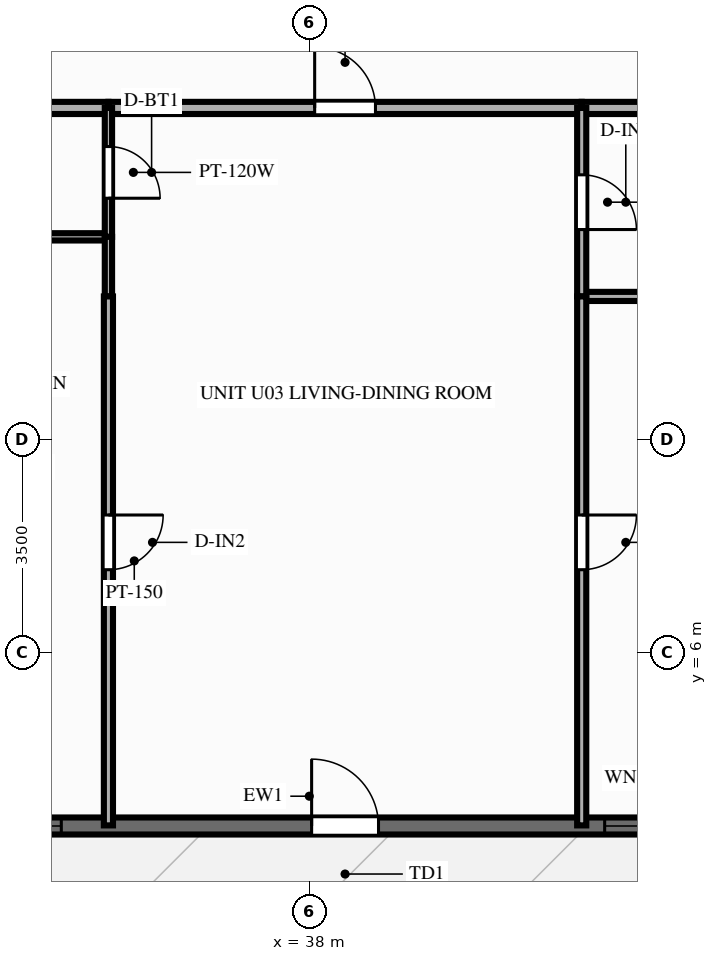
"""IFC4 building model, lengths in metres.
Left out: names, types, materials, properties, quantities, classifications, styles, units other than length and angle.
Written with IfcOpenShell. Run it as: python <this file> out.ifc"""

import sys

from ifc_helpers import new_model, si_unit, direction, frame, frame_2d, origin, place, context, subcontext, project, spatial, rectangle, extrude, source, transform, mapped, element, fill, save


model = new_model("IFC4")
c1 = context("Model", 3, precision=1e-05, world=origin(), true_north=direction((0.0, 1.0)))
c2 = subcontext(c1, "Body", "Model", "MODEL_VIEW")
j1 = project(units=[si_unit("LENGTHUNIT", "METRE"), si_unit("PLANEANGLEUNIT", "RADIAN")], contexts=[c1])
p1 = place(None, origin())
s1 = spatial("IfcSite", under=j1, at=p1, CompositionType="ELEMENT")
p2 = place(p1, origin())
s2 = spatial("IfcBuilding", under=s1, at=p2, CompositionType="ELEMENT")
p3 = place(p2, frame((0.0, 0.0, 80.85)))
s3 = spatial("IfcBuildingStorey", under=s2, at=p3, CompositionType="ELEMENT", Elevation=80.85)
p4 = place(p3, frame((16.2, 3.14, 0.0), z_axis=(0.0, 0.0, 1.0), x_axis=(1.0, 0.0, 0.0)))
e1 = element("IfcWall", 1, at=p4, inside=s3, PredefinedType="SOLIDWALL", context=c2, shape_type="SweptSolid", body=[
    extrude(rectangle(XDim=43.6, YDim=0.28, at=frame_2d((21.8, 0.0))), origin(), (0.0, 0.0, 1.0), 2.28),
])
p5 = place(p4, frame((0.748, 0.0, 0.25)))
e2 = element("IfcOpeningElement", 2, at=p5, cuts=e1, PredefinedType="OPENING", context=c2, shape_type="SweptSolid", body=[
    extrude(rectangle(XDim=1.2, YDim=1.5, at=frame_2d((0.6, 0.75))), frame((0.0, 0.152, 0.0), z_axis=(0.0, -1.0, 0.0), x_axis=(1.0, 0.0, 0.0)), (0.0, 0.0, 1.0), 0.304),
])
p6 = place(p4, frame((3.093, 0.0, 0.25)))
e3 = element("IfcOpeningElement", 3, at=p6, cuts=e1, PredefinedType="OPENING", context=c2, shape_type="SweptSolid", body=[
    extrude(rectangle(XDim=1.2, YDim=1.5, at=frame_2d((0.6, 0.75))), frame((0.0, 0.152, 0.0), z_axis=(0.0, -1.0, 0.0), x_axis=(1.0, 0.0, 0.0)), (0.0, 0.0, 1.0), 0.304),
])
p7 = place(p4, frame((5.885, 0.0, 0.25)))
e4 = element("IfcOpeningElement", 4, at=p7, cuts=e1, PredefinedType="OPENING", context=c2, shape_type="SweptSolid", body=[
    extrude(rectangle(XDim=1.2, YDim=1.5, at=frame_2d((0.6, 0.75))), frame((0.0, 0.152, 0.0), z_axis=(0.0, -1.0, 0.0), x_axis=(1.0, 0.0, 0.0)), (0.0, 0.0, 1.0), 0.304),
])
p8 = place(p4, frame((8.463, 0.0, 0.25)))
e5 = element("IfcOpeningElement", 5, at=p8, cuts=e1, PredefinedType="OPENING", context=c2, shape_type="SweptSolid", body=[
    extrude(rectangle(XDim=1.2, YDim=1.5, at=frame_2d((0.6, 0.75))), frame((0.0, 0.152, 0.0), z_axis=(0.0, -1.0, 0.0), x_axis=(1.0, 0.0, 0.0)), (0.0, 0.0, 1.0), 0.304),
])
p9 = place(p4, frame((10.876, 0.0, 0.25)))
e6 = element("IfcOpeningElement", 6, at=p9, cuts=e1, PredefinedType="OPENING", context=c2, shape_type="SweptSolid", body=[
    extrude(rectangle(XDim=1.2, YDim=1.5, at=frame_2d((0.6, 0.75))), frame((0.0, 0.152, 0.0), z_axis=(0.0, -1.0, 0.0), x_axis=(1.0, 0.0, 0.0)), (0.0, 0.0, 1.0), 0.304),
])
p10 = place(p4, frame((13.287, 0.0, 0.25)))
e7 = element("IfcOpeningElement", 7, at=p10, cuts=e1, PredefinedType="OPENING", context=c2, shape_type="SweptSolid", body=[
    extrude(rectangle(XDim=1.2, YDim=1.5, at=frame_2d((0.6, 0.75))), frame((0.0, 0.152, 0.0), z_axis=(0.0, -1.0, 0.0), x_axis=(1.0, 0.0, 0.0)), (0.0, 0.0, 1.0), 0.304),
])
p11 = place(p4, frame((16.521, 0.0, 0.25)))
e8 = element("IfcOpeningElement", 8, at=p11, cuts=e1, PredefinedType="OPENING", context=c2, shape_type="SweptSolid", body=[
    extrude(rectangle(XDim=1.2, YDim=1.5, at=frame_2d((0.6, 0.75))), frame((0.0, 0.152, 0.0), z_axis=(0.0, -1.0, 0.0), x_axis=(1.0, 0.0, 0.0)), (0.0, 0.0, 1.0), 0.304),
])
p12 = place(p4, frame((22.938, 0.0, 0.0), z_axis=(0.0, 0.0, 1.0), x_axis=(-1.0, 0.0, 0.0)))
e9 = element("IfcOpeningElement", 9, at=p12, cuts=e1, PredefinedType="OPENING", context=c2, shape_type="SweptSolid", body=[
    extrude(rectangle(XDim=1.1, YDim=2.15, at=frame_2d((0.55, 1.075))), frame((0.0, 0.152, 0.0), z_axis=(0.0, -1.0, 0.0), x_axis=(1.0, 0.0, 0.0)), (0.0, 0.0, 1.0), 0.304),
])
p13 = place(p4, frame((26.657, 0.0, 0.25)))
e10 = element("IfcOpeningElement", 10, at=p13, cuts=e1, PredefinedType="OPENING", context=c2, shape_type="SweptSolid", body=[
    extrude(rectangle(XDim=0.95, YDim=1.5, at=frame_2d((0.475, 0.75))), frame((0.0, 0.152, 0.0), z_axis=(0.0, -1.0, 0.0), x_axis=(1.0, 0.0, 0.0)), (0.0, 0.0, 1.0), 0.304),
])
p14 = place(p4, frame((28.965, 0.0, 0.25)))
e11 = element("IfcOpeningElement", 11, at=p14, cuts=e1, PredefinedType="OPENING", context=c2, shape_type="SweptSolid", body=[
    extrude(rectangle(XDim=0.7, YDim=1.5, at=frame_2d((0.35, 0.75))), frame((0.0, 0.152, 0.0), z_axis=(0.0, -1.0, 0.0), x_axis=(1.0, 0.0, 0.0)), (0.0, 0.0, 1.0), 0.304),
])
p15 = place(p4, frame((31.158, 0.0, 0.25)))
e12 = element("IfcOpeningElement", 12, at=p15, cuts=e1, PredefinedType="OPENING", context=c2, shape_type="SweptSolid", body=[
    extrude(rectangle(XDim=1.2, YDim=1.5, at=frame_2d((0.6, 0.75))), frame((0.0, 0.152, 0.0), z_axis=(0.0, -1.0, 0.0), x_axis=(1.0, 0.0, 0.0)), (0.0, 0.0, 1.0), 0.304),
])
p16 = place(p4, frame((35.992, 0.0, 0.25)))
e13 = element("IfcOpeningElement", 13, at=p16, cuts=e1, PredefinedType="OPENING", context=c2, shape_type="SweptSolid", body=[
    extrude(rectangle(XDim=1.2, YDim=1.5, at=frame_2d((0.6, 0.75))), frame((0.0, 0.152, 0.0), z_axis=(0.0, -1.0, 0.0), x_axis=(1.0, 0.0, 0.0)), (0.0, 0.0, 1.0), 0.304),
])
p17 = place(p4, frame((40.885, 0.0, 0.25)))
e14 = element("IfcOpeningElement", 14, at=p17, cuts=e1, PredefinedType="OPENING", context=c2, shape_type="SweptSolid", body=[
    extrude(rectangle(XDim=1.2, YDim=1.5, at=frame_2d((0.6, 0.75))), frame((0.0, 0.152, 0.0), z_axis=(0.0, -1.0, 0.0), x_axis=(1.0, 0.0, 0.0)), (0.0, 0.0, 1.0), 0.304),
])
p18 = place(p3, frame((31.946, 14.95, 0.0), z_axis=(0.0, 0.0, 1.0), x_axis=(1.0, 0.0, 0.0)))
e15 = element("IfcWall", 15, at=p18, inside=s3, PredefinedType="PARTITIONING", context=c2, shape_type="SweptSolid", body=[
    extrude(rectangle(XDim=2.75, YDim=0.2, at=frame_2d((1.375, 0.0))), origin(), (0.0, 0.0, 1.0), 2.79),
])
p19 = place(p3, frame((34.696, 14.95, 0.0), z_axis=(0.0, 0.0, 1.0), x_axis=(1.0, 0.0, 0.0)))
e16 = element("IfcWall", 16, at=p19, inside=s3, PredefinedType="PARTITIONING", context=c2, shape_type="SweptSolid", body=[
    extrude(rectangle(XDim=7.784, YDim=0.2, at=frame_2d((3.892, 0.0))), origin(), (0.0, 0.0, 1.0), 2.79),
])
p20 = place(p19, frame((3.392, 0.0, 0.0)))
e17 = element("IfcOpeningElement", 17, at=p20, cuts=e16, PredefinedType="OPENING", context=c2, shape_type="SweptSolid", body=[
    extrude(rectangle(XDim=1.0, YDim=2.15, at=frame_2d((0.5, 1.075))), frame((0.0, 0.112, 0.0), z_axis=(0.0, -1.0, 0.0), x_axis=(1.0, 0.0, 0.0)), (0.0, 0.0, 1.0), 0.224),
])
p21 = place(p3, frame((42.48, 14.95, 0.0), z_axis=(0.0, 0.0, 1.0), x_axis=(1.0, 0.0, 0.0)))
e18 = element("IfcWall", 18, at=p21, inside=s3, PredefinedType="PARTITIONING", context=c2, shape_type="SweptSolid", body=[
    extrude(rectangle(XDim=3.736, YDim=0.2, at=frame_2d((1.868, 0.0))), origin(), (0.0, 0.0, 1.0), 2.79),
])
p22 = place(p3, frame((31.946, 12.83, 0.0), z_axis=(0.0, 0.0, 1.0), x_axis=(1.0, 0.0, 0.0)))
e19 = element("IfcWall", 19, at=p22, inside=s3, PredefinedType="PARTITIONING", context=c2, shape_type="SweptSolid", body=[
    extrude(rectangle(XDim=2.75, YDim=0.12, at=frame_2d((1.375, 0.0))), origin(), (0.0, 0.0, 1.0), 2.79),
])
p23 = place(p3, frame((42.48, 11.85, 0.0), z_axis=(0.0, 0.0, 1.0), x_axis=(1.0, 0.0, 0.0)))
e20 = element("IfcWall", 20, at=p23, inside=s3, PredefinedType="PARTITIONING", context=c2, shape_type="SweptSolid", body=[
    extrude(rectangle(XDim=3.736, YDim=0.15, at=frame_2d((1.868, 0.0))), origin(), (0.0, 0.0, 1.0), 2.79),
])
p24 = place(p3, frame((34.696, 14.95, 0.0), z_axis=(0.0, 0.0, 1.0), x_axis=(0.0, -1.0, 0.0)))
e21 = element("IfcWall", 21, at=p24, inside=s3, PredefinedType="PARTITIONING", context=c2, shape_type="SweptSolid", body=[
    extrude(rectangle(XDim=2.12, YDim=0.12, at=frame_2d((1.06, 0.0))), origin(), (0.0, 0.0, 1.0), 2.79),
])
p25 = place(p24, frame((0.635, 0.0, 0.0)))
e22 = element("IfcOpeningElement", 22, at=p25, cuts=e21, PredefinedType="OPENING", context=c2, shape_type="SweptSolid", body=[
    extrude(rectangle(XDim=0.85, YDim=2.05, at=frame_2d((0.425, 1.025))), frame((0.0, 0.072, 0.0), z_axis=(0.0, -1.0, 0.0), x_axis=(1.0, 0.0, 0.0)), (0.0, 0.0, 1.0), 0.144),
])
p26 = place(p3, frame((34.696, 12.83, 0.0), z_axis=(0.0, 0.0, 1.0), x_axis=(0.0, -1.0, 0.0)))
e23 = element("IfcWall", 23, at=p26, inside=s3, PredefinedType="PARTITIONING", context=c2, shape_type="SweptSolid", body=[
    extrude(rectangle(XDim=0.98, YDim=0.12, at=frame_2d((0.49, 0.0))), origin(), (0.0, 0.0, 1.0), 2.79),
])
p27 = place(p3, frame((34.696, 11.85, 0.0), z_axis=(0.0, 0.0, 1.0), x_axis=(0.0, -1.0, 0.0)))
e24 = element("IfcWall", 24, at=p27, inside=s3, PredefinedType="PARTITIONING", context=c2, shape_type="SweptSolid", body=[
    extrude(rectangle(XDim=8.7, YDim=0.15, at=frame_2d((4.35, 0.0))), origin(), (0.0, 0.0, 1.0), 2.79),
])
p28 = place(p27, frame((3.595, 0.0, 0.0)))
e25 = element("IfcOpeningElement", 25, at=p28, cuts=e24, PredefinedType="OPENING", context=c2, shape_type="SweptSolid", body=[
    extrude(rectangle(XDim=0.9, YDim=2.1, at=frame_2d((0.45, 1.05))), frame((0.0, 0.087, 0.0), z_axis=(0.0, -1.0, 0.0), x_axis=(1.0, 0.0, 0.0)), (0.0, 0.0, 1.0), 0.174),
])
p29 = place(p3, frame((42.48, 14.95, 0.0), z_axis=(0.0, 0.0, 1.0), x_axis=(0.0, -1.0, 0.0)))
e26 = element("IfcWall", 26, at=p29, inside=s3, PredefinedType="PARTITIONING", context=c2, shape_type="SweptSolid", body=[
    extrude(rectangle(XDim=3.1, YDim=0.15, at=frame_2d((1.55, 0.0))), origin(), (0.0, 0.0, 1.0), 2.79),
])
p30 = place(p29, frame((1.1, 0.0, 0.0)))
e27 = element("IfcOpeningElement", 27, at=p30, cuts=e26, PredefinedType="OPENING", context=c2, shape_type="SweptSolid", body=[
    extrude(rectangle(XDim=0.9, YDim=2.1, at=frame_2d((0.45, 1.05))), frame((0.0, 0.087, 0.0), z_axis=(0.0, -1.0, 0.0), x_axis=(1.0, 0.0, 0.0)), (0.0, 0.0, 1.0), 0.174),
])
p31 = place(p3, frame((42.48, 11.85, 0.0), z_axis=(0.0, 0.0, 1.0), x_axis=(0.0, -1.0, 0.0)))
e28 = element("IfcWall", 28, at=p31, inside=s3, PredefinedType="PARTITIONING", context=c2, shape_type="SweptSolid", body=[
    extrude(rectangle(XDim=8.7, YDim=0.15, at=frame_2d((4.35, 0.0))), origin(), (0.0, 0.0, 1.0), 2.79),
])
p32 = place(p31, frame((3.595, 0.0, 0.0)))
e29 = element("IfcOpeningElement", 29, at=p32, cuts=e28, PredefinedType="OPENING", context=c2, shape_type="SweptSolid", body=[
    extrude(rectangle(XDim=0.9, YDim=2.1, at=frame_2d((0.45, 1.05))), frame((0.0, 0.087, 0.0), z_axis=(0.0, -1.0, 0.0), x_axis=(1.0, 0.0, 0.0)), (0.0, 0.0, 1.0), 0.174),
])
m1 = source(origin(), c2, "Body", "SweptSolid", [
    extrude(rectangle(XDim=1.2, YDim=1.5, at=frame_2d((0.6, 0.75))), frame((0.0, 0.03, 0.0), z_axis=(0.0, -1.0, 0.0), x_axis=(1.0, 0.0, 0.0)), (0.0, 0.0, 1.0), 0.06),
])
p33 = place(p11, origin())
e30 = element("IfcWindow", 30, at=p33, inside=s3, PartitioningType="SINGLE_PANEL", PredefinedType="WINDOW", context=c2, shape_type="MappedRepresentation", body=[
    mapped(m1, transform((0.0, 0.0, 0.0), scale=1.0)),
])
fill(e8, e30)
m2 = source(origin(), c2, "Body", "SweptSolid", [
    extrude(rectangle(XDim=1.1, YDim=2.15, at=frame_2d((0.55, 1.075))), frame((0.0, 0.025, 0.0), z_axis=(0.0, -1.0, 0.0), x_axis=(1.0, 0.0, 0.0)), (0.0, 0.0, 1.0), 0.05),
])
p34 = place(p12, origin())
e31 = element("IfcDoor", 31, at=p34, inside=s3, OperationType="SINGLE_SWING_RIGHT", PredefinedType="DOOR", context=c2, shape_type="MappedRepresentation", body=[
    mapped(m2, transform((0.0, 0.0, 0.0), scale=1.0)),
])
fill(e9, e31)
m3 = source(origin(), c2, "Body", "SweptSolid", [
    extrude(rectangle(XDim=0.95, YDim=1.5, at=frame_2d((0.475, 0.75))), frame((0.0, 0.03, 0.0), z_axis=(0.0, -1.0, 0.0), x_axis=(1.0, 0.0, 0.0)), (0.0, 0.0, 1.0), 0.06),
])
p35 = place(p13, origin())
e32 = element("IfcWindow", 32, at=p35, inside=s3, PartitioningType="SINGLE_PANEL", PredefinedType="WINDOW", context=c2, shape_type="MappedRepresentation", body=[
    mapped(m3, transform((0.0, 0.0, 0.0), scale=1.0)),
])
fill(e10, e32)
m4 = source(origin(), c2, "Body", "SweptSolid", [
    extrude(rectangle(XDim=1.0, YDim=2.15, at=frame_2d((0.5, 1.075))), frame((0.0, 0.025, 0.0), z_axis=(0.0, -1.0, 0.0), x_axis=(1.0, 0.0, 0.0)), (0.0, 0.0, 1.0), 0.05),
])
p36 = place(p20, origin())
e33 = element("IfcDoor", 33, at=p36, inside=s3, OperationType="SINGLE_SWING_LEFT", PredefinedType="DOOR", context=c2, shape_type="MappedRepresentation", body=[
    mapped(m4, transform((0.0, 0.0, 0.0), scale=1.0)),
])
fill(e17, e33)
m5 = source(origin(), c2, "Body", "SweptSolid", [
    extrude(rectangle(XDim=0.85, YDim=2.05, at=frame_2d((0.425, 1.025))), frame((0.0, 0.025, 0.0), z_axis=(0.0, -1.0, 0.0), x_axis=(1.0, 0.0, 0.0)), (0.0, 0.0, 1.0), 0.05),
])
p37 = place(p25, origin())
e34 = element("IfcDoor", 34, at=p37, inside=s3, OperationType="SINGLE_SWING_RIGHT", PredefinedType="DOOR", context=c2, shape_type="MappedRepresentation", body=[
    mapped(m5, transform((0.0, 0.0, 0.0), scale=1.0)),
])
fill(e22, e34)
m6 = source(origin(), c2, "Body", "SweptSolid", [
    extrude(rectangle(XDim=0.9, YDim=2.1, at=frame_2d((0.45, 1.05))), frame((0.0, 0.025, 0.0), z_axis=(0.0, -1.0, 0.0), x_axis=(1.0, 0.0, 0.0)), (0.0, 0.0, 1.0), 0.05),
])
p38 = place(p28, origin())
e35 = element("IfcDoor", 35, at=p38, inside=s3, OperationType="SINGLE_SWING_LEFT", PredefinedType="DOOR", context=c2, shape_type="MappedRepresentation", body=[
    mapped(m6, transform((0.0, 0.0, 0.0), scale=1.0)),
])
fill(e25, e35)
p39 = place(p30, origin())
e36 = element("IfcDoor", 36, at=p39, inside=s3, OperationType="SINGLE_SWING_RIGHT", PredefinedType="DOOR", context=c2, shape_type="MappedRepresentation", body=[
    mapped(m6, transform((0.0, 0.0, 0.0), scale=1.0)),
])
fill(e27, e36)
p40 = place(p32, origin())
e37 = element("IfcDoor", 37, at=p40, inside=s3, OperationType="SINGLE_SWING_LEFT", PredefinedType="DOOR", context=c2, shape_type="MappedRepresentation", body=[
    mapped(m6, transform((0.0, 0.0, 0.0), scale=1.0)),
])
fill(e29, e37)
save(model, sys.argv[1])
